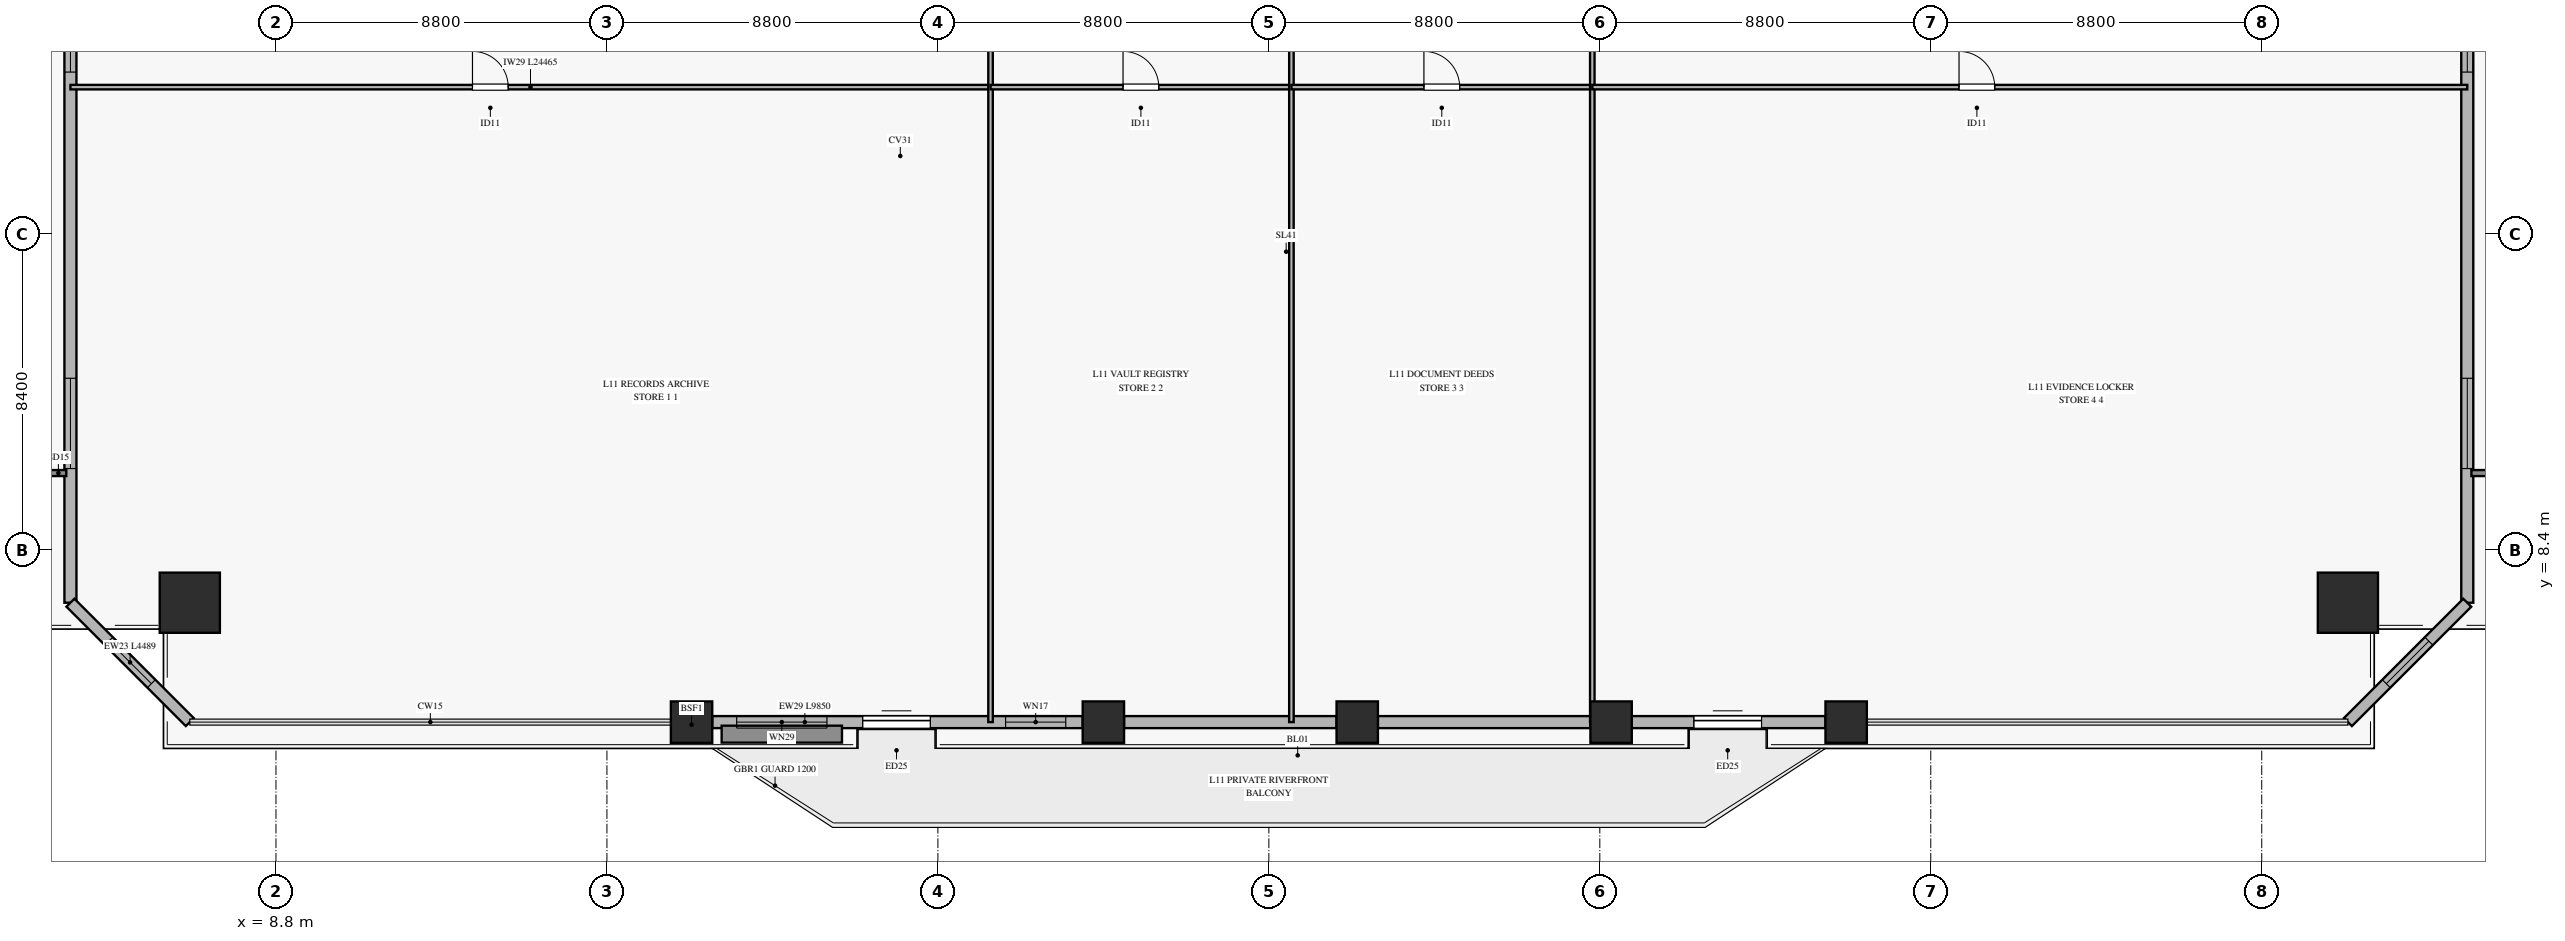
"""IFC4 building model, lengths in metres.
Left out: names, types, materials, properties, quantities, classifications, styles, units other than length and angle.
Written with IfcOpenShell. Run it as: python <this file> out.ifc"""

import sys

from ifc_helpers import new_model, si_unit, direction, frame, frame_2d, origin, origin_2d, place, context, subcontext, project, spatial, rectangle, hollow_rectangle, extrude, source, transform, mapped, element, fill, save


model = new_model("IFC4")
c1 = context("Model", 3, precision=1e-05, world=origin(), true_north=direction((0.0, 1.0)))
c2 = subcontext(c1, "Body", "Model", "MODEL_VIEW")
j1 = project(units=[si_unit("LENGTHUNIT", "METRE"), si_unit("PLANEANGLEUNIT", "RADIAN")], contexts=[c1])
p1 = place(None, origin())
s1 = spatial("IfcSite", under=j1, at=p1, CompositionType="ELEMENT")
p2 = place(p1, origin())
s2 = spatial("IfcBuilding", under=s1, at=p2, CompositionType="ELEMENT")
p3 = place(p2, frame((0.0, 0.0, 44.9)))
s3 = spatial("IfcBuildingStorey", under=s2, at=p3, CompositionType="ELEMENT", Elevation=44.9)
m1 = source(origin(), c2, "Body", "SweptSolid", [
    extrude(hollow_rectangle(XDim=1.6, YDim=1.6, WallThickness=0.075, at=origin_2d()), origin(), (0.0, 0.0, 1.0), 3.661),
])
for number, where, z_axis, x_axis in (
    (1, (6.509, 7.001, 0.0), (0.057, 0.137, 0.989), (-0.923, 0.385, 0.0)),
    (2, (63.891, 7.001, 0.0), (-0.057, 0.137, 0.989), (-0.923, -0.385, 0.0)),
):
    element("IfcColumn", number, at=place(p3, frame(where, z_axis=z_axis, x_axis=x_axis)), inside=s3, PredefinedType="COLUMN", context=c2, shape_type="MappedRepresentation", body=[
        mapped(m1, transform((0.0, 0.0, 0.0), x_axis=(1.0, 0.0, 0.0), y_axis=(0.0, 1.0, 0.0), z_axis=(0.0, 0.0, 1.0), scale=1.0)),
    ])
m2 = source(origin(), c2, "Body", "SweptSolid", [
    extrude(hollow_rectangle(XDim=1.1, YDim=1.1, WallThickness=0.05, at=origin_2d()), origin(), (0.0, 0.0, 1.0), 3.658),
])
for number, where, z_axis, x_axis in (
    (3, (19.85, 3.827, 0.0), (0.0, 0.144, 0.99), (-1.0, 0.0, 0.0)),
    (4, (30.8, 3.827, 0.0), (0.0, 0.144, 0.99), (-1.0, 0.0, 0.0)),
    (5, (37.55, 3.827, 0.0), (0.0, 0.144, 0.99), (-1.0, 0.0, 0.0)),
    (6, (44.3, 3.827, 0.0), (0.0, 0.144, 0.99), (-1.0, 0.0, 0.0)),
    (7, (50.55, 3.827, 0.0), (0.0, 0.144, 0.99), (-1.0, 0.0, 0.0)),
):
    element("IfcColumn", number, at=place(p3, frame(where, z_axis=z_axis, x_axis=x_axis)), inside=s3, PredefinedType="COLUMN", context=c2, shape_type="MappedRepresentation", body=[
        mapped(m2, transform((0.0, 0.0, 0.0), x_axis=(1.0, 0.0, 0.0), y_axis=(0.0, 1.0, 0.0), z_axis=(0.0, 0.0, 1.0), scale=1.0)),
    ])
p4 = place(p3, frame((20.4, 3.827, 0.0), z_axis=(0.0, 0.0, 1.0), x_axis=(1.0, 0.0, 0.0)))
e8 = element("IfcWall", 8, at=p4, inside=s3, PredefinedType="SOLIDWALL", context=c2, shape_type="SweptSolid", body=[
    extrude(rectangle(XDim=9.85, YDim=0.32, at=frame_2d((4.925, 0.0))), origin(), (0.0, 0.0, 1.0), 3.1),
])
p5 = place(p4, frame((4.0, 0.0, 0.0)))
e9 = element("IfcOpeningElement", 9, at=p5, cuts=e8, PredefinedType="OPENING", context=c2, shape_type="SweptSolid", body=[
    extrude(rectangle(XDim=1.8, YDim=2.25, at=frame_2d((0.9, 1.125))), frame((0.0, 0.17, 0.0), z_axis=(0.0, -1.0, 0.0), x_axis=(1.0, 0.0, 0.0)), (0.0, 0.0, 1.0), 0.34),
])
p6 = place(p4, frame((0.65, 0.0, 0.45)))
e10 = element("IfcOpeningElement", 10, at=p6, cuts=e8, PredefinedType="OPENING", context=c2, shape_type="SweptSolid", body=[
    extrude(rectangle(XDim=2.4, YDim=2.1, at=frame_2d((1.2, 1.05))), frame((0.0, 0.17, 0.0), z_axis=(0.0, -1.0, 0.0), x_axis=(1.0, 0.0, 0.0)), (0.0, 0.0, 1.0), 0.34),
])
p7 = place(p4, frame((7.8, 0.0, 0.45)))
e11 = element("IfcOpeningElement", 11, at=p7, cuts=e8, PredefinedType="OPENING", context=c2, shape_type="SweptSolid", body=[
    extrude(rectangle(XDim=1.6, YDim=2.0, at=frame_2d((0.8, 1.0))), frame((0.0, 0.17, 0.0), z_axis=(0.0, -1.0, 0.0), x_axis=(1.0, 0.0, 0.0)), (0.0, 0.0, 1.0), 0.34),
])
for number, where, z_axis, x_axis in (
    (12, (31.35, 3.827, 0.0), (0.0, 0.0, 1.0), (1.0, 0.0, 0.0)),
    (13, (38.1, 3.827, 0.0), (0.0, 0.0, 1.0), (1.0, 0.0, 0.0)),
):
    element("IfcWall", number, at=place(p3, frame(where, z_axis=z_axis, x_axis=x_axis)), inside=s3, PredefinedType="SOLIDWALL", context=c2, shape_type="SweptSolid", body=[
        extrude(rectangle(XDim=5.65, YDim=0.32, at=frame_2d((2.825, 0.0))), origin(), (0.0, 0.0, 1.0), 3.1),
    ])
p8 = place(p3, frame((44.85, 3.827, 0.0), z_axis=(0.0, 0.0, 1.0), x_axis=(1.0, 0.0, 0.0)))
e14 = element("IfcWall", 14, at=p8, inside=s3, PredefinedType="SOLIDWALL", context=c2, shape_type="SweptSolid", body=[
    extrude(rectangle(XDim=5.15, YDim=0.32, at=frame_2d((2.575, 0.0))), origin(), (0.0, 0.0, 1.0), 3.1),
])
p9 = place(p8, frame((1.65, 0.0, 0.0)))
e15 = element("IfcOpeningElement", 15, at=p9, cuts=e14, PredefinedType="OPENING", context=c2, shape_type="SweptSolid", body=[
    extrude(rectangle(XDim=1.8, YDim=2.25, at=frame_2d((0.9, 1.125))), frame((0.0, 0.17, 0.0), z_axis=(0.0, -1.0, 0.0), x_axis=(1.0, 0.0, 0.0)), (0.0, 0.0, 1.0), 0.34),
])
p10 = place(p3, frame((3.335, 7.001, 0.0), z_axis=(0.0, 0.0, 1.0), x_axis=(0.0, 1.0, 0.0)))
e16 = element("IfcWall", 16, at=p10, inside=s3, PredefinedType="SOLIDWALL", context=c2, shape_type="SweptSolid", body=[
    extrude(rectangle(XDim=17.412, YDim=0.32, at=frame_2d((8.706, 0.0))), origin(), (0.0, 0.0, 1.0), 3.1),
])
p11 = place(p10, frame((3.567, 0.0, 0.45)))
e17 = element("IfcOpeningElement", 17, at=p11, cuts=e16, PredefinedType="OPENING", context=c2, shape_type="SweptSolid", body=[
    extrude(rectangle(XDim=2.4, YDim=2.1, at=frame_2d((1.2, 1.05))), frame((0.0, 0.17, 0.0), z_axis=(0.0, -1.0, 0.0), x_axis=(1.0, 0.0, 0.0)), (0.0, 0.0, 1.0), 0.34),
])
p12 = place(p10, frame((14.107, 0.0, 0.45)))
e18 = element("IfcOpeningElement", 18, at=p12, cuts=e16, PredefinedType="OPENING", context=c2, shape_type="SweptSolid", body=[
    extrude(rectangle(XDim=2.4, YDim=2.1, at=frame_2d((1.2, 1.05))), frame((0.0, 0.17, 0.0), z_axis=(0.0, -1.0, 0.0), x_axis=(1.0, 0.0, 0.0)), (0.0, 0.0, 1.0), 0.34),
])
p13 = place(p3, frame((67.065, 7.001, 0.0), z_axis=(0.0, 0.0, 1.0), x_axis=(0.0, 1.0, 0.0)))
e19 = element("IfcWall", 19, at=p13, inside=s3, PredefinedType="SOLIDWALL", context=c2, shape_type="SweptSolid", body=[
    extrude(rectangle(XDim=17.412, YDim=0.32, at=frame_2d((8.706, 0.0))), origin(), (0.0, 0.0, 1.0), 3.1),
])
p14 = place(p13, frame((3.567, 0.0, 0.45)))
e20 = element("IfcOpeningElement", 20, at=p14, cuts=e19, PredefinedType="OPENING", context=c2, shape_type="SweptSolid", body=[
    extrude(rectangle(XDim=2.4, YDim=2.1, at=frame_2d((1.2, 1.05))), frame((0.0, 0.17, 0.0), z_axis=(0.0, -1.0, 0.0), x_axis=(1.0, 0.0, 0.0)), (0.0, 0.0, 1.0), 0.34),
])
p15 = place(p13, frame((14.107, 0.0, 0.45)))
e21 = element("IfcOpeningElement", 21, at=p15, cuts=e19, PredefinedType="OPENING", context=c2, shape_type="SweptSolid", body=[
    extrude(rectangle(XDim=2.4, YDim=2.1, at=frame_2d((1.2, 1.05))), frame((0.0, 0.17, 0.0), z_axis=(0.0, -1.0, 0.0), x_axis=(1.0, 0.0, 0.0)), (0.0, 0.0, 1.0), 0.34),
])
p16 = place(p3, frame((3.335, 7.001, 0.0), z_axis=(0.0, 0.0, 1.0), x_axis=(0.707106781187, -0.707106781187, 0.0)))
e22 = element("IfcWall", 22, at=p16, inside=s3, PredefinedType="SOLIDWALL", context=c2, shape_type="SweptSolid", body=[
    extrude(rectangle(XDim=4.489, YDim=0.3, at=frame_2d((2.244, 0.0))), origin(), (0.0, 0.0, 1.0), 3.1),
])
p17 = place(p16, frame((1.444, 0.0, 0.45)))
e23 = element("IfcOpeningElement", 23, at=p17, cuts=e22, PredefinedType="OPENING", context=c2, shape_type="SweptSolid", body=[
    extrude(rectangle(XDim=1.6, YDim=2.0, at=frame_2d((0.8, 1.0))), frame((0.0, 0.16, 0.0), z_axis=(0.0, -1.0, 0.0), x_axis=(1.0, 0.0, 0.0)), (0.0, 0.0, 1.0), 0.32),
])
p18 = place(p3, frame((63.891, 3.827, 0.0), z_axis=(0.0, 0.0, 1.0), x_axis=(0.707079585295, 0.707133976032, 0.0)))
e24 = element("IfcWall", 24, at=p18, inside=s3, PredefinedType="SOLIDWALL", context=c2, shape_type="SweptSolid", body=[
    extrude(rectangle(XDim=4.489, YDim=0.3, at=frame_2d((2.244, 0.0))), origin(), (0.0, 0.0, 1.0), 3.1),
])
p19 = place(p18, frame((1.444, 0.0, 0.45)))
e25 = element("IfcOpeningElement", 25, at=p19, cuts=e24, PredefinedType="OPENING", context=c2, shape_type="SweptSolid", body=[
    extrude(rectangle(XDim=1.6, YDim=2.0, at=frame_2d((0.8, 1.0))), frame((0.0, 0.16, 0.0), z_axis=(0.0, -1.0, 0.0), x_axis=(1.0, 0.0, 0.0)), (0.0, 0.0, 1.0), 0.32),
])
p20 = place(p3, frame((3.335, 20.708, 0.0), z_axis=(0.0, 0.0, 1.0), x_axis=(1.0, 0.0, 0.0)))
e26 = element("IfcWall", 26, at=p20, inside=s3, PredefinedType="PARTITIONING", context=c2, shape_type="SweptSolid", body=[
    extrude(rectangle(XDim=24.465, YDim=0.12, at=frame_2d((12.232, 0.0))), origin(), (0.0, 0.0, 1.0), 2.705),
])
p21 = place(p20, frame((10.69, 0.0, 0.0)))
e27 = element("IfcOpeningElement", 27, at=p21, cuts=e26, PredefinedType="OPENING", context=c2, shape_type="SweptSolid", body=[
    extrude(rectangle(XDim=0.95, YDim=2.1, at=frame_2d((0.475, 1.05))), frame((0.0, 0.07, 0.0), z_axis=(0.0, -1.0, 0.0), x_axis=(1.0, 0.0, 0.0)), (0.0, 0.0, 1.0), 0.14),
])
p22 = place(p3, frame((27.8, 3.827, 0.0), z_axis=(0.0, 0.0, 1.0), x_axis=(0.0, 1.0, 0.0)))
e28 = element("IfcWall", 28, at=p22, inside=s3, PredefinedType="PARTITIONING", context=c2, shape_type="SweptSolid", body=[
    extrude(rectangle(XDim=29.573, YDim=0.12, at=frame_2d((14.787, 0.0))), origin(), (0.0, 0.0, 1.0), 3.105),
])
p23 = place(p3, frame((27.8, 20.708, 0.0), z_axis=(0.0, 0.0, 1.0), x_axis=(1.0, 0.0, 0.0)))
e29 = element("IfcWall", 29, at=p23, inside=s3, PredefinedType="PARTITIONING", context=c2, shape_type="SweptSolid", body=[
    extrude(rectangle(XDim=8.0, YDim=0.12, at=frame_2d((4.0, 0.0))), origin(), (0.0, 0.0, 1.0), 2.705),
])
p24 = place(p23, frame((3.523, 0.0, 0.0)))
e30 = element("IfcOpeningElement", 30, at=p24, cuts=e29, PredefinedType="OPENING", context=c2, shape_type="SweptSolid", body=[
    extrude(rectangle(XDim=0.95, YDim=2.1, at=frame_2d((0.475, 1.05))), frame((0.0, 0.07, 0.0), z_axis=(0.0, -1.0, 0.0), x_axis=(1.0, 0.0, 0.0)), (0.0, 0.0, 1.0), 0.14),
])
p25 = place(p3, frame((35.8, 3.827, 0.0), z_axis=(0.0, 0.0, 1.0), x_axis=(0.0, 1.0, 0.0)))
e31 = element("IfcWall", 31, at=p25, inside=s3, PredefinedType="PARTITIONING", context=c2, shape_type="SweptSolid", body=[
    extrude(rectangle(XDim=29.573, YDim=0.12, at=frame_2d((14.787, 0.0))), origin(), (0.0, 0.0, 1.0), 3.105),
])
p26 = place(p3, frame((35.8, 20.708, 0.0), z_axis=(0.0, 0.0, 1.0), x_axis=(1.0, 0.0, 0.0)))
e32 = element("IfcWall", 32, at=p26, inside=s3, PredefinedType="PARTITIONING", context=c2, shape_type="SweptSolid", body=[
    extrude(rectangle(XDim=8.0, YDim=0.12, at=frame_2d((4.0, 0.0))), origin(), (0.0, 0.0, 1.0), 2.705),
])
p27 = place(p26, frame((3.523, 0.0, 0.0)))
e33 = element("IfcOpeningElement", 33, at=p27, cuts=e32, PredefinedType="OPENING", context=c2, shape_type="SweptSolid", body=[
    extrude(rectangle(XDim=0.95, YDim=2.1, at=frame_2d((0.475, 1.05))), frame((0.0, 0.07, 0.0), z_axis=(0.0, -1.0, 0.0), x_axis=(1.0, 0.0, 0.0)), (0.0, 0.0, 1.0), 0.14),
])
p28 = place(p3, frame((43.8, 3.827, 0.0), z_axis=(0.0, 0.0, 1.0), x_axis=(0.0, 1.0, 0.0)))
e34 = element("IfcWall", 34, at=p28, inside=s3, PredefinedType="PARTITIONING", context=c2, shape_type="SweptSolid", body=[
    extrude(rectangle(XDim=29.573, YDim=0.12, at=frame_2d((14.787, 0.0))), origin(), (0.0, 0.0, 1.0), 3.155),
])
p29 = place(p3, frame((43.8, 20.708, 0.0), z_axis=(0.0, 0.0, 1.0), x_axis=(1.0, 0.0, 0.0)))
e35 = element("IfcWall", 35, at=p29, inside=s3, PredefinedType="PARTITIONING", context=c2, shape_type="SweptSolid", body=[
    extrude(rectangle(XDim=23.265, YDim=0.12, at=frame_2d((11.632, 0.0))), origin(), (0.0, 0.0, 1.0), 2.705),
])
p30 = place(p29, frame((9.751, 0.0, 0.0)))
e36 = element("IfcOpeningElement", 36, at=p30, cuts=e35, PredefinedType="OPENING", context=c2, shape_type="SweptSolid", body=[
    extrude(rectangle(XDim=0.95, YDim=2.1, at=frame_2d((0.475, 1.05))), frame((0.0, 0.07, 0.0), z_axis=(0.0, -1.0, 0.0), x_axis=(1.0, 0.0, 0.0)), (0.0, 0.0, 1.0), 0.14),
])
m3 = source(origin(), c2, "Body", "SweptSolid", [
    extrude(rectangle(XDim=1.8, YDim=2.25, at=frame_2d((0.9, 1.125))), frame((0.0, 0.025, 0.0), z_axis=(0.0, -1.0, 0.0), x_axis=(1.0, 0.0, 0.0)), (0.0, 0.0, 1.0), 0.05),
])
p31 = place(p5, origin())
e37 = element("IfcDoor", 37, at=p31, inside=s3, OperationType="SLIDING_TO_LEFT", PredefinedType="DOOR", context=c2, shape_type="MappedRepresentation", body=[
    mapped(m3, transform((0.0, 0.0, 0.0), x_axis=(1.0, 0.0, 0.0), y_axis=(0.0, 1.0, 0.0), z_axis=(0.0, 0.0, 1.0), scale=1.0)),
])
fill(e9, e37)
m4 = source(origin(), c2, "Body", "SweptSolid", [
    extrude(rectangle(XDim=2.4, YDim=2.1, at=frame_2d((1.2, 1.05))), frame((0.0, 0.03, 0.0), z_axis=(0.0, -1.0, 0.0), x_axis=(1.0, 0.0, 0.0)), (0.0, 0.0, 1.0), 0.06),
])
p32 = place(p6, origin())
e38 = element("IfcWindow", 38, at=p32, inside=s3, PartitioningType="SINGLE_PANEL", PredefinedType="WINDOW", context=c2, shape_type="MappedRepresentation", body=[
    mapped(m4, transform((0.0, 0.0, 0.0), x_axis=(1.0, 0.0, 0.0), y_axis=(0.0, 1.0, 0.0), z_axis=(0.0, 0.0, 1.0), scale=1.0)),
])
fill(e10, e38)
m5 = source(origin(), c2, "Body", "SweptSolid", [
    extrude(rectangle(XDim=1.6, YDim=2.0, at=frame_2d((0.8, 1.0))), frame((0.0, 0.03, 0.0), z_axis=(0.0, -1.0, 0.0), x_axis=(1.0, 0.0, 0.0)), (0.0, 0.0, 1.0), 0.06),
])
p33 = place(p7, origin())
e39 = element("IfcWindow", 39, at=p33, inside=s3, PartitioningType="SINGLE_PANEL", PredefinedType="WINDOW", context=c2, shape_type="MappedRepresentation", body=[
    mapped(m5, transform((0.0, 0.0, 0.0), x_axis=(1.0, 0.0, 0.0), y_axis=(0.0, 1.0, 0.0), z_axis=(0.0, 0.0, 1.0), scale=1.0)),
])
fill(e11, e39)
p34 = place(p9, origin())
e40 = element("IfcDoor", 40, at=p34, inside=s3, OperationType="SLIDING_TO_LEFT", PredefinedType="DOOR", context=c2, shape_type="MappedRepresentation", body=[
    mapped(m3, transform((0.0, 0.0, 0.0), x_axis=(1.0, 0.0, 0.0), y_axis=(0.0, 1.0, 0.0), z_axis=(0.0, 0.0, 1.0), scale=1.0)),
])
fill(e15, e40)
p35 = place(p11, origin())
e41 = element("IfcWindow", 41, at=p35, inside=s3, PartitioningType="SINGLE_PANEL", PredefinedType="WINDOW", context=c2, shape_type="MappedRepresentation", body=[
    mapped(m4, transform((0.0, 0.0, 0.0), x_axis=(1.0, 0.0, 0.0), y_axis=(0.0, 1.0, 0.0), z_axis=(0.0, 0.0, 1.0), scale=1.0)),
])
fill(e17, e41)
p36 = place(p12, origin())
e42 = element("IfcWindow", 42, at=p36, inside=s3, PartitioningType="SINGLE_PANEL", PredefinedType="WINDOW", context=c2, shape_type="MappedRepresentation", body=[
    mapped(m4, transform((0.0, 0.0, 0.0), x_axis=(1.0, 0.0, 0.0), y_axis=(0.0, 1.0, 0.0), z_axis=(0.0, 0.0, 1.0), scale=1.0)),
])
fill(e18, e42)
p37 = place(p14, origin())
e43 = element("IfcWindow", 43, at=p37, inside=s3, PartitioningType="SINGLE_PANEL", PredefinedType="WINDOW", context=c2, shape_type="MappedRepresentation", body=[
    mapped(m4, transform((0.0, 0.0, 0.0), x_axis=(1.0, 0.0, 0.0), y_axis=(0.0, 1.0, 0.0), z_axis=(0.0, 0.0, 1.0), scale=1.0)),
])
fill(e20, e43)
p38 = place(p15, origin())
e44 = element("IfcWindow", 44, at=p38, inside=s3, PartitioningType="SINGLE_PANEL", PredefinedType="WINDOW", context=c2, shape_type="MappedRepresentation", body=[
    mapped(m4, transform((0.0, 0.0, 0.0), x_axis=(1.0, 0.0, 0.0), y_axis=(0.0, 1.0, 0.0), z_axis=(0.0, 0.0, 1.0), scale=1.0)),
])
fill(e21, e44)
p39 = place(p17, origin())
e45 = element("IfcWindow", 45, at=p39, inside=s3, PartitioningType="SINGLE_PANEL", PredefinedType="WINDOW", context=c2, shape_type="MappedRepresentation", body=[
    mapped(m5, transform((0.0, 0.0, 0.0), x_axis=(1.0, 0.0, 0.0), y_axis=(0.0, 1.0, 0.0), z_axis=(0.0, 0.0, 1.0), scale=1.0)),
])
fill(e23, e45)
p40 = place(p19, origin())
e46 = element("IfcWindow", 46, at=p40, inside=s3, PartitioningType="SINGLE_PANEL", PredefinedType="WINDOW", context=c2, shape_type="MappedRepresentation", body=[
    mapped(m5, transform((0.0, 0.0, 0.0), x_axis=(1.0, 0.0, 0.0), y_axis=(0.0, 1.0, 0.0), z_axis=(0.0, 0.0, 1.0), scale=1.0)),
])
fill(e25, e46)
m6 = source(origin(), c2, "Body", "SweptSolid", [
    extrude(rectangle(XDim=0.95, YDim=2.1, at=frame_2d((0.475, 1.05))), frame((0.0, 0.025, 0.0), z_axis=(0.0, -1.0, 0.0), x_axis=(1.0, 0.0, 0.0)), (0.0, 0.0, 1.0), 0.05),
])
p41 = place(p21, origin())
e47 = element("IfcDoor", 47, at=p41, inside=s3, OperationType="SINGLE_SWING_LEFT", PredefinedType="DOOR", context=c2, shape_type="MappedRepresentation", body=[
    mapped(m6, transform((0.0, 0.0, 0.0), x_axis=(1.0, 0.0, 0.0), y_axis=(0.0, 1.0, 0.0), z_axis=(0.0, 0.0, 1.0), scale=1.0)),
])
fill(e27, e47)
p42 = place(p24, origin())
e48 = element("IfcDoor", 48, at=p42, inside=s3, OperationType="SINGLE_SWING_LEFT", PredefinedType="DOOR", context=c2, shape_type="MappedRepresentation", body=[
    mapped(m6, transform((0.0, 0.0, 0.0), x_axis=(1.0, 0.0, 0.0), y_axis=(0.0, 1.0, 0.0), z_axis=(0.0, 0.0, 1.0), scale=1.0)),
])
fill(e30, e48)
p43 = place(p27, origin())
e49 = element("IfcDoor", 49, at=p43, inside=s3, OperationType="SINGLE_SWING_LEFT", PredefinedType="DOOR", context=c2, shape_type="MappedRepresentation", body=[
    mapped(m6, transform((0.0, 0.0, 0.0), x_axis=(1.0, 0.0, 0.0), y_axis=(0.0, 1.0, 0.0), z_axis=(0.0, 0.0, 1.0), scale=1.0)),
])
fill(e33, e49)
p44 = place(p30, origin())
e50 = element("IfcDoor", 50, at=p44, inside=s3, OperationType="SINGLE_SWING_LEFT", PredefinedType="DOOR", context=c2, shape_type="MappedRepresentation", body=[
    mapped(m6, transform((0.0, 0.0, 0.0), x_axis=(1.0, 0.0, 0.0), y_axis=(0.0, 1.0, 0.0), z_axis=(0.0, 0.0, 1.0), scale=1.0)),
])
fill(e36, e50)
save(model, sys.argv[1])
